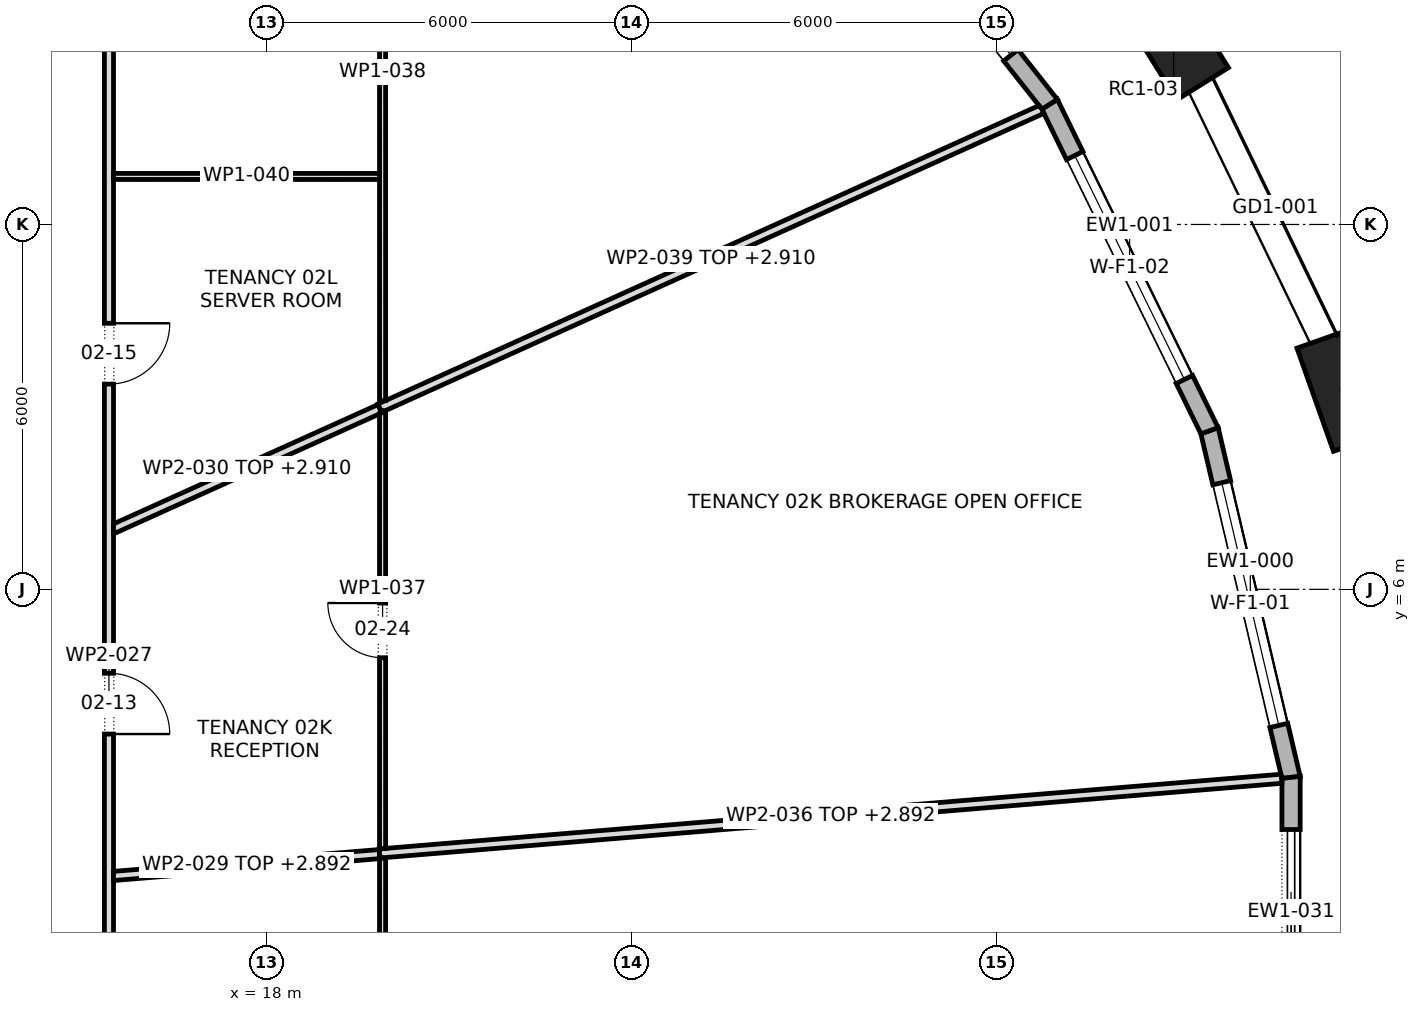
"""IFC4 building model, lengths in metres.
Left out: names, types, materials, properties, quantities, classifications, styles, units other than length and angle.
Written with IfcOpenShell. Run it as: python <this file> out.ifc"""

import sys

from ifc_helpers import new_model, si_unit, direction, frame, frame_2d, origin, origin_2d, place, context, subcontext, project, spatial, polyline, rectangle, outline, extrude, element, fill, save


model = new_model("IFC4")
c1 = context("Model", 3, precision=1e-05, world=origin(), true_north=direction((0.0, 1.0)))
c2 = subcontext(c1, "Body", "Model", "MODEL_VIEW")
j1 = project(units=[si_unit("LENGTHUNIT", "METRE"), si_unit("PLANEANGLEUNIT", "RADIAN")], contexts=[c1])
p1 = place(None, origin())
s1 = spatial("IfcSite", under=j1, at=p1, CompositionType="ELEMENT")
p2 = place(p1, origin())
s2 = spatial("IfcBuilding", under=s1, at=p2, CompositionType="ELEMENT")
p3 = place(p2, frame((0.0, 0.0, 44.5)))
s3 = spatial("IfcBuildingStorey", under=s2, at=p3, CompositionType="ELEMENT", Elevation=44.5)
for number, where, z_axis, x_axis in (
    (1, (35.709, 9.285, 0.0), (0.0, 0.0, 1.0), (-0.334, 0.943, 0.0)),
    (2, (32.91, 15.078, 0.0), (0.0, 0.0, 1.0), (-0.529, 0.849, 0.0)),
):
    element("IfcColumn", number, at=place(p3, frame(where, z_axis=z_axis, x_axis=x_axis)), inside=s3, PredefinedType="COLUMN", context=c2, shape_type="SweptSolid", body=[
        extrude(rectangle(XDim=1.8, YDim=1.0, at=origin_2d()), origin(), (0.0, 0.0, 1.0), 4.2),
    ])
p4 = place(p3, frame((34.84, 2.907, 0.0), z_axis=(0.0, 0.0, 1.0), x_axis=(-0.228976600496, 0.97343192696, 0.0)))
e3 = element("IfcWall", 3, at=p4, inside=s3, PredefinedType="STANDARD", context=c2, shape_type="SweptSolid", body=[
    extrude(outline(polyline([(-0.017, -0.15), (5.874, -0.15), (5.84, 0.15), (0.017, 0.15), (-0.017, -0.15)])), origin(), (0.0, 0.0, 1.0), 3.9),
])
p5 = place(p4, frame((0.878, 0.0, 0.6)))
e4 = element("IfcOpeningElement", 4, at=p5, cuts=e3, PredefinedType="OPENING", context=c2, shape_type="SweptSolid", body=[
    extrude(rectangle(XDim=4.1, YDim=2.85, at=frame_2d((2.05, 1.425))), frame((0.0, 0.162, 0.0), z_axis=(0.0, -1.0, 0.0), x_axis=(1.0, 0.0, 0.0)), (0.0, 0.0, 1.0), 0.324),
])
p6 = place(p3, frame((33.499, 8.608, 0.0), z_axis=(0.0, 0.0, 1.0), x_axis=(-0.439896354052, 0.898048549741, 0.0)))
e5 = element("IfcWall", 5, at=p6, inside=s3, PredefinedType="STANDARD", context=c2, shape_type="SweptSolid", body=[
    extrude(outline(polyline([(-0.017, -0.15), (5.994, -0.15), (5.962, 0.15), (0.017, 0.15), (-0.017, -0.15)])), origin(), (0.0, 0.0, 1.0), 3.9),
])
p7 = place(p6, frame((0.939, 0.0, 0.6)))
e6 = element("IfcOpeningElement", 6, at=p7, cuts=e5, PredefinedType="OPENING", context=c2, shape_type="SweptSolid", body=[
    extrude(rectangle(XDim=4.1, YDim=2.85, at=frame_2d((2.05, 1.425))), frame((0.0, 0.162, 0.0), z_axis=(0.0, -1.0, 0.0), x_axis=(1.0, 0.0, 0.0)), (0.0, 0.0, 1.0), 0.324),
])
p8 = place(p3, frame((30.869, 13.976, 0.0), z_axis=(0.0, 0.0, 1.0), x_axis=(-0.61992334328, 0.784662378642, 0.0)))
e7 = element("IfcWall", 7, at=p8, inside=s3, PredefinedType="STANDARD", context=c2, shape_type="SweptSolid", body=[
    extrude(outline(polyline([(-0.016, -0.15), (6.17, -0.15), (6.14, 0.15), (0.016, 0.15), (-0.016, -0.15)])), origin(), (0.0, 0.0, 1.0), 3.9),
])
p9 = place(p8, frame((1.027, 0.0, 0.6)))
e8 = element("IfcOpeningElement", 8, at=p9, cuts=e7, PredefinedType="OPENING", context=c2, shape_type="SweptSolid", body=[
    extrude(rectangle(XDim=4.1, YDim=2.85, at=frame_2d((2.05, 1.425))), frame((0.0, 0.162, 0.0), z_axis=(0.0, -1.0, 0.0), x_axis=(1.0, 0.0, 0.0)), (0.0, 0.0, 1.0), 0.324),
])
p10 = place(p3, frame((34.84, -2.907, 0.0), z_axis=(0.0, 0.0, 1.0), x_axis=(0.0, 1.0, 0.0)))
e9 = element("IfcWall", 9, at=p10, inside=s3, PredefinedType="STANDARD", context=c2, shape_type="SweptSolid", body=[
    extrude(outline(polyline([(-0.017, -0.15), (5.831, -0.15), (5.796, 0.15), (0.017, 0.15), (-0.017, -0.15)])), origin(), (0.0, 0.0, 1.0), 3.9),
])
p11 = place(p10, frame((0.857, 0.0, 0.0)))
e10 = element("IfcOpeningElement", 10, at=p11, cuts=e9, PredefinedType="OPENING", context=c2, shape_type="SweptSolid", body=[
    extrude(rectangle(XDim=4.1, YDim=3.45, at=frame_2d((2.05, 1.725))), frame((0.0, 0.162, 0.0), z_axis=(0.0, -1.0, 0.0), x_axis=(1.0, 0.0, 0.0)), (0.0, 0.0, 1.0), 0.324),
])
p12 = place(p3, frame((15.4, -6.96, 0.0), z_axis=(0.0, 0.0, 1.0), x_axis=(0.0, 1.0, 0.0)))
e11 = element("IfcWall", 11, at=p12, inside=s3, PredefinedType="PARTITIONING", context=c2, shape_type="SweptSolid", body=[
    extrude(outline(polyline([(0.0, -0.075), (1.87, -0.075), (3.739, -0.075), (5.609, -0.075), (7.478, -0.075), (9.348, -0.075), (11.217, -0.075), (13.087, -0.075), (14.957, -0.075), (16.826, -0.075), (18.696, -0.075), (20.565, -0.075), (22.435, -0.075), (22.285, 0.075), (20.428, 0.075), (18.571, 0.075), (16.714, 0.075), (14.857, 0.075), (13.0, 0.075), (11.143, 0.075), (9.285, 0.075), (7.428, 0.075), (5.571, 0.075), (3.714, 0.075), (1.857, 0.075), (0.0, 0.075), (0.0, -0.075)])), origin(), (0.0, 0.0, 1.0), 3.9),
])
p13 = place(p12, frame((3.62, 0.0, 0.0)))
e12 = element("IfcOpeningElement", 12, at=p13, cuts=e11, PredefinedType="OPENING", context=c2, shape_type="SweptSolid", body=[
    extrude(rectangle(XDim=1.0, YDim=2.1, at=frame_2d((0.5, 1.05))), frame((0.0, 0.087, 0.0), z_axis=(0.0, -1.0, 0.0), x_axis=(1.0, 0.0, 0.0)), (0.0, 0.0, 1.0), 0.174),
])
p14 = place(p12, frame((10.58, 0.0, 0.0)))
e13 = element("IfcOpeningElement", 13, at=p14, cuts=e11, PredefinedType="OPENING", context=c2, shape_type="SweptSolid", body=[
    extrude(rectangle(XDim=1.0, YDim=2.1, at=frame_2d((0.5, 1.05))), frame((0.0, 0.087, 0.0), z_axis=(0.0, -1.0, 0.0), x_axis=(1.0, 0.0, 0.0)), (0.0, 0.0, 1.0), 0.174),
])
p15 = place(p12, frame((16.335, 0.0, 0.0)))
e14 = element("IfcOpeningElement", 14, at=p15, cuts=e11, PredefinedType="OPENING", context=c2, shape_type="SweptSolid", body=[
    extrude(rectangle(XDim=1.0, YDim=2.1, at=frame_2d((0.5, 1.05))), frame((0.0, 0.087, 0.0), z_axis=(0.0, -1.0, 0.0), x_axis=(1.0, 0.0, 0.0)), (0.0, 0.0, 1.0), 0.174),
])
p16 = place(p3, frame((15.469, 1.286, 0.0), z_axis=(0.0, 0.0, 1.0), x_axis=(0.996634800256, 0.081969963512, 0.0)))
e15 = element("IfcWall", 15, at=p16, inside=s3, PredefinedType="PARTITIONING", context=c2, shape_type="SweptSolid", body=[
    extrude(outline(polyline([(0.0, -0.075), (1.463, -0.075), (2.926, -0.075), (4.389, -0.075), (4.389, -0.075), (4.393, -0.075), (4.396, -0.075), (4.396, 0.075), (2.935, 0.075), (1.473, 0.075), (0.012, 0.075), (0.0, -0.07), (0.0, -0.075)])), origin(), (0.0, 0.0, 1.0), 2.892),
])
p17 = place(p3, frame((15.444, 6.98, 0.0), z_axis=(0.0, 0.0, 1.0), x_axis=(0.911543776443, 0.411203044285, 0.0)))
e16 = element("IfcWall", 16, at=p17, inside=s3, PredefinedType="PARTITIONING", context=c2, shape_type="SweptSolid", body=[
    extrude(outline(polyline([(0.0, -0.075), (1.6, -0.075), (3.2, -0.075), (4.8, -0.075), (4.8, -0.074), (4.802, -0.075), (4.842, -0.075), (4.842, 0.075), (3.251, 0.075), (1.659, 0.075), (0.068, 0.075), (0.0, -0.075)])), origin(), (0.0, 0.0, 1.0), 2.91),
])
p18 = place(p3, frame((19.9, 1.588, 0.0), z_axis=(0.0, 0.0, 1.0), x_axis=(0.0, -1.0, 0.0)))
e17 = element("IfcWall", 17, at=p18, inside=s3, PredefinedType="PARTITIONING", context=c2, shape_type="SweptSolid", body=[
    extrude(outline(polyline([(0.018, -0.05), (1.76, -0.05), (3.503, -0.05), (5.246, -0.05), (6.988, -0.05), (8.731, -0.05), (10.473, -0.05), (10.518, 0.049), (10.518, 0.05), (8.765, 0.05), (7.012, 0.05), (5.259, 0.05), (3.506, 0.05), (1.753, 0.05), (0.0, 0.05), (0.0, 0.044), (0.007, -0.043), (0.0, -0.044), (0.0, -0.044), (0.017, -0.043), (0.018, -0.05)])), origin(), (0.0, 0.0, 1.0), 3.9),
])
p19 = place(p18, frame((4.809, 0.0, 0.0)))
e18 = element("IfcOpeningElement", 18, at=p19, cuts=e17, PredefinedType="OPENING", context=c2, shape_type="SweptSolid", body=[
    extrude(rectangle(XDim=0.9, YDim=2.1, at=frame_2d((0.45, 1.05))), frame((0.0, 0.062, 0.0), z_axis=(0.0, -1.0, 0.0), x_axis=(1.0, 0.0, 0.0)), (0.0, 0.0, 1.0), 0.124),
])
p20 = place(p3, frame((19.85, 1.656, 0.0), z_axis=(0.0, 0.0, 1.0), x_axis=(0.996587936268, 0.082537780956, 0.0)))
e19 = element("IfcWall", 19, at=p20, inside=s3, PredefinedType="PARTITIONING", context=c2, shape_type="SweptSolid", body=[
    extrude(outline(polyline([(14.884, -0.075), (14.884, 0.05), (14.881, 0.075), (13.021, 0.075), (11.16, 0.075), (9.3, 0.075), (7.44, 0.075), (5.58, 0.075), (3.72, 0.075), (1.86, 0.075), (0.0, 0.075), (0.0, -0.068), (0.087, -0.075), (1.937, -0.075), (3.786, -0.075), (5.636, -0.075), (7.486, -0.075), (9.335, -0.075), (11.185, -0.075), (13.035, -0.075), (14.884, -0.075)])), origin(), (0.0, 0.0, 1.0), 2.892),
])
p21 = place(p3, frame((19.9, 8.94, 0.0), z_axis=(0.0, 0.0, 1.0), x_axis=(0.0, -1.0, 0.0)))
e20 = element("IfcWall", 20, at=p21, inside=s3, PredefinedType="PARTITIONING", context=c2, shape_type="SweptSolid", body=[
    extrude(outline(polyline([(7.208, -0.05), (7.208, -0.046), (7.201, 0.05), (5.4, 0.05), (3.6, 0.05), (1.8, 0.05), (0.0, 0.05), (0.0, 0.049), (0.029, -0.015), (0.0, -0.028), (0.0, -0.028), (0.037, -0.011), (0.055, -0.05), (1.843, -0.05), (3.632, -0.05), (5.42, -0.05), (7.208, -0.05)])), origin(), (0.0, 0.0, 1.0), 3.9),
])
p22 = place(p21, frame((3.165, 0.0, 0.0)))
e21 = element("IfcOpeningElement", 21, at=p22, cuts=e20, PredefinedType="OPENING", context=c2, shape_type="SweptSolid", body=[
    extrude(rectangle(XDim=0.9, YDim=2.1, at=frame_2d((0.45, 1.05))), frame((0.0, 0.062, 0.0), z_axis=(0.0, -1.0, 0.0), x_axis=(1.0, 0.0, 0.0)), (0.0, 0.0, 1.0), 0.124),
])
p23 = place(p3, frame((19.9, 9.103, 0.0), z_axis=(0.0, 0.0, 1.0), x_axis=(0.0, 1.0, 0.0)))
e22 = element("IfcWall", 22, at=p23, inside=s3, PredefinedType="PARTITIONING", context=c2, shape_type="SweptSolid", body=[
    extrude(outline(polyline([(0.0, -0.05), (1.808, -0.05), (3.616, -0.05), (5.424, -0.05), (7.232, -0.05), (9.04, -0.05), (10.847, -0.05), (10.747, 0.05), (8.956, 0.05), (7.165, 0.05), (5.374, 0.05), (3.583, 0.05), (1.791, 0.05), (0.0, 0.05), (0.0, -0.05)])), origin(), (0.0, 0.0, 1.0), 3.9),
])
p24 = place(p3, frame((19.854, 8.979, 0.0), z_axis=(0.0, 0.0, 1.0), x_axis=(0.911433390516, 0.411447657245, 0.0)))
e23 = element("IfcWall", 23, at=p24, inside=s3, PredefinedType="PARTITIONING", context=c2, shape_type="SweptSolid", body=[
    extrude(outline(polyline([(11.948, -0.075), (11.948, -0.063), (11.946, 0.001), (11.927, 0.075), (9.963, 0.075), (7.998, 0.075), (6.033, 0.075), (4.068, 0.075), (2.104, 0.075), (0.139, 0.075), (0.138, 0.073), (0.133, 0.075), (0.0, 0.075), (0.0, -0.043), (0.07, -0.075), (2.05, -0.075), (4.029, -0.075), (6.009, -0.075), (7.989, -0.075), (9.968, -0.075), (11.948, -0.075)])), origin(), (0.0, 0.0, 1.0), 2.91),
])
p25 = place(p3, frame((19.85, 12.79, 0.0), z_axis=(0.0, 0.0, 1.0), x_axis=(-1.0, 0.0, 0.0)))
e24 = element("IfcWall", 24, at=p25, inside=s3, PredefinedType="PARTITIONING", context=c2, shape_type="SweptSolid", body=[
    extrude(rectangle(XDim=4.375, YDim=0.1, at=frame_2d((2.188, 0.0))), origin(), (0.0, 0.0, 1.0), 3.9),
])
p26 = place(p5, origin())
e25 = element("IfcWindow", 25, at=p26, inside=s3, PartitioningType="TRIPLE_PANEL_VERTICAL", PredefinedType="WINDOW", context=c2, shape_type="SweptSolid", body=[
    extrude(rectangle(XDim=4.1, YDim=2.85, at=frame_2d((2.05, 1.425))), frame((0.0, 0.03, 0.0), z_axis=(0.0, -1.0, 0.0), x_axis=(1.0, 0.0, 0.0)), (0.0, 0.0, 1.0), 0.06),
])
fill(e4, e25)
p27 = place(p7, origin())
e26 = element("IfcWindow", 26, at=p27, inside=s3, PartitioningType="TRIPLE_PANEL_VERTICAL", PredefinedType="WINDOW", context=c2, shape_type="SweptSolid", body=[
    extrude(rectangle(XDim=4.1, YDim=2.85, at=frame_2d((2.05, 1.425))), frame((0.0, 0.03, 0.0), z_axis=(0.0, -1.0, 0.0), x_axis=(1.0, 0.0, 0.0)), (0.0, 0.0, 1.0), 0.06),
])
fill(e6, e26)
p28 = place(p9, origin())
e27 = element("IfcWindow", 27, at=p28, inside=s3, PartitioningType="TRIPLE_PANEL_VERTICAL", PredefinedType="WINDOW", context=c2, shape_type="SweptSolid", body=[
    extrude(rectangle(XDim=4.1, YDim=2.85, at=frame_2d((2.05, 1.425))), frame((0.0, 0.03, 0.0), z_axis=(0.0, -1.0, 0.0), x_axis=(1.0, 0.0, 0.0)), (0.0, 0.0, 1.0), 0.06),
])
fill(e8, e27)
p29 = place(p11, origin())
e28 = element("IfcDoor", 28, at=p29, inside=s3, OperationType="DOUBLE_DOOR_SLIDING", PredefinedType="DOOR", context=c2, shape_type="SweptSolid", body=[
    extrude(rectangle(XDim=4.1, YDim=3.45, at=frame_2d((2.05, 1.725))), frame((0.0, 0.025, 0.0), z_axis=(0.0, -1.0, 0.0), x_axis=(1.0, 0.0, 0.0)), (0.0, 0.0, 1.0), 0.05),
])
fill(e10, e28)
p30 = place(p14, frame((1.0, 0.0, 0.0), z_axis=(0.0, 0.0, 1.0), x_axis=(-1.0, 0.0, 0.0)))
e29 = element("IfcDoor", 29, at=p30, inside=s3, OperationType="SINGLE_SWING_LEFT", PredefinedType="DOOR", context=c2, shape_type="SweptSolid", body=[
    extrude(rectangle(XDim=1.0, YDim=2.1, at=frame_2d((0.5, 1.05))), frame((0.0, 0.025, 0.0), z_axis=(0.0, -1.0, 0.0), x_axis=(1.0, 0.0, 0.0)), (0.0, 0.0, 1.0), 0.05),
])
fill(e13, e29)
p31 = place(p15, frame((1.0, 0.0, 0.0), z_axis=(0.0, 0.0, 1.0), x_axis=(-1.0, 0.0, 0.0)))
e30 = element("IfcDoor", 30, at=p31, inside=s3, OperationType="SINGLE_SWING_RIGHT", PredefinedType="DOOR", context=c2, shape_type="SweptSolid", body=[
    extrude(rectangle(XDim=1.0, YDim=2.1, at=frame_2d((0.5, 1.05))), frame((0.0, 0.025, 0.0), z_axis=(0.0, -1.0, 0.0), x_axis=(1.0, 0.0, 0.0)), (0.0, 0.0, 1.0), 0.05),
])
fill(e14, e30)
p32 = place(p22, frame((0.9, 0.0, 0.0), z_axis=(0.0, 0.0, 1.0), x_axis=(-1.0, 0.0, 0.0)))
e31 = element("IfcDoor", 31, at=p32, inside=s3, OperationType="SINGLE_SWING_LEFT", PredefinedType="DOOR", context=c2, shape_type="SweptSolid", body=[
    extrude(rectangle(XDim=0.9, YDim=2.1, at=frame_2d((0.45, 1.05))), frame((0.0, 0.025, 0.0), z_axis=(0.0, -1.0, 0.0), x_axis=(1.0, 0.0, 0.0)), (0.0, 0.0, 1.0), 0.05),
])
fill(e21, e31)
save(model, sys.argv[1])
